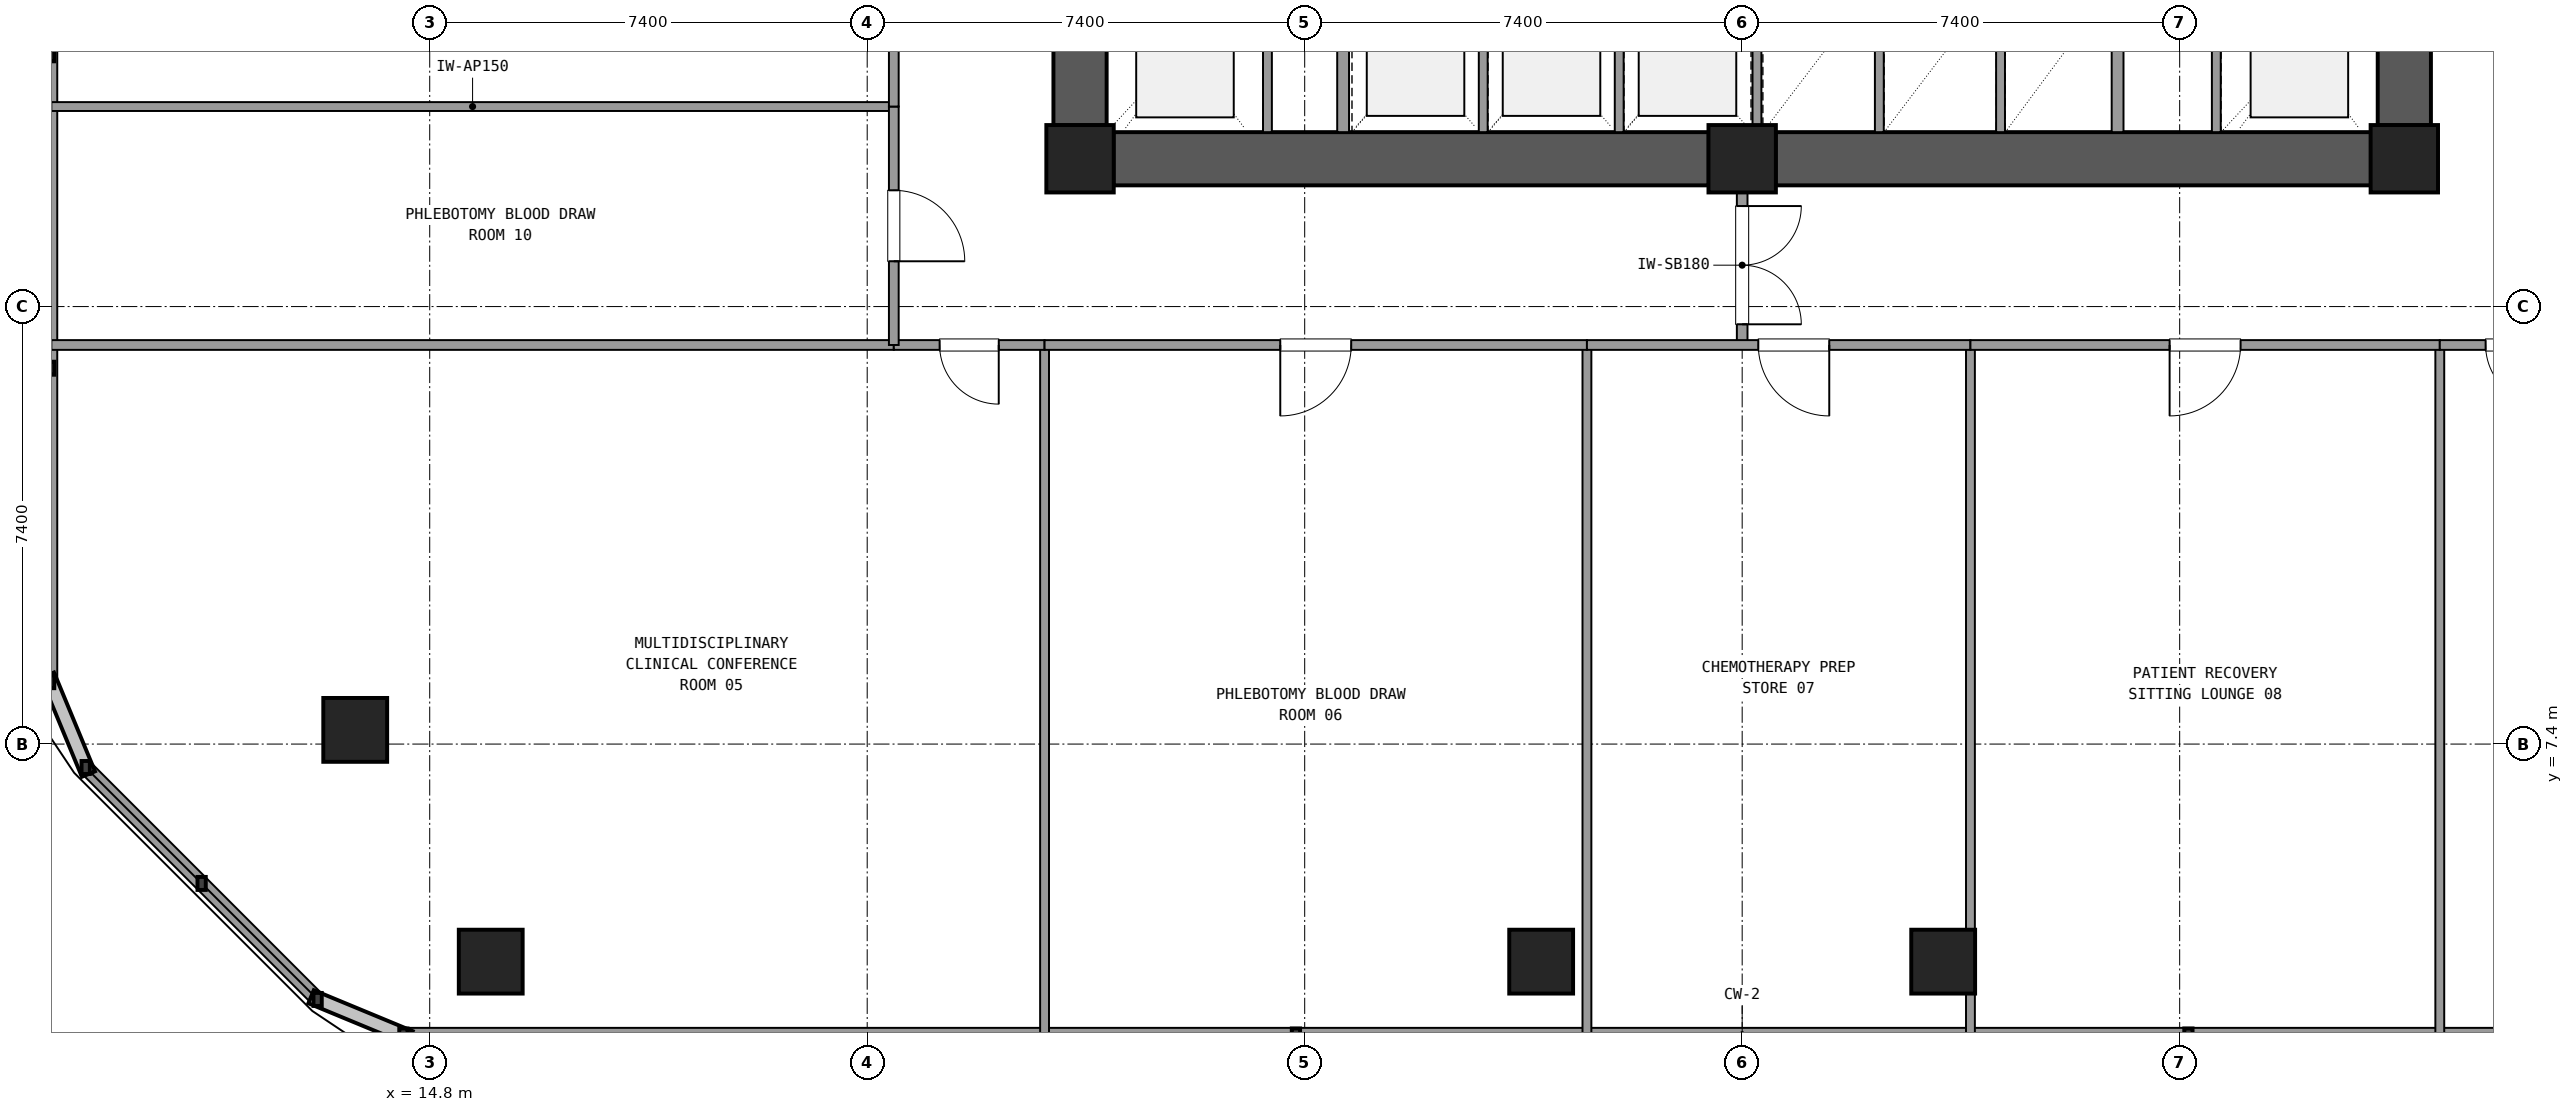
"""IFC4 building model, lengths in metres.
Left out: names, types, materials, properties, quantities, classifications, styles, units other than length and angle.
Written with IfcOpenShell. Run it as: python <this file> out.ifc"""

import sys

from ifc_helpers import new_model, si_unit, direction, frame, frame_2d, origin, origin_2d, place, context, subcontext, project, spatial, rectangle, extrude, element, fill, save


model = new_model("IFC4")
c1 = context("Model", 3, precision=1e-05, world=origin(), true_north=direction((0.0, 1.0)))
c2 = subcontext(c1, "Body", "Model", "MODEL_VIEW")
j1 = project(units=[si_unit("LENGTHUNIT", "METRE"), si_unit("PLANEANGLEUNIT", "RADIAN")], contexts=[c1])
p1 = place(None, origin())
s1 = spatial("IfcSite", under=j1, at=p1, CompositionType="ELEMENT")
p2 = place(p1, origin())
s2 = spatial("IfcBuilding", under=s1, at=p2, CompositionType="ELEMENT")
p3 = place(p2, frame((0.0, 0.0, 56.34)))
s3 = spatial("IfcBuildingStorey", under=s2, at=p3, CompositionType="ELEMENT", Elevation=56.34)
for number, where, z_axis, x_axis in (
    (1, (25.8, 17.3, 0.0), (0.0, 0.0, 1.0), (1.0, 0.0, 0.0)),
    (2, (37.0, 17.3, 0.0), (0.0, 0.0, 1.0), (1.0, 0.0, 0.0)),
    (3, (48.2, 17.3, 0.0), (0.0, 0.0, 1.0), (1.0, 0.0, 0.0)),
):
    element("IfcColumn", number, at=place(p3, frame(where, z_axis=z_axis, x_axis=x_axis)), inside=s3, PredefinedType="COLUMN", context=c2, shape_type="SweptSolid", body=[
        extrude(rectangle(XDim=1.14, YDim=1.14, at=origin_2d()), origin(), (0.0, 0.0, 1.0), 3.6),
    ])
for number, where, z_axis, x_axis in (
    (4, (26.365, 17.3, 0.0), (0.0, 0.0, 1.0), (1.0, 0.0, 0.0)),
    (5, (37.565, 17.3, 0.0), (0.0, 0.0, 1.0), (1.0, 0.0, 0.0)),
):
    element("IfcWall", number, at=place(p3, frame(where, z_axis=z_axis, x_axis=x_axis)), inside=s3, PredefinedType="SHEAR", context=c2, shape_type="SweptSolid", body=[
        extrude(rectangle(XDim=10.07, YDim=0.9, at=frame_2d((5.035, 0.0))), origin(), (0.0, 0.0, 1.0), 3.32),
    ])
p4 = place(p3, frame((48.2, 17.865, 0.0), z_axis=(0.0, 0.0, 1.0), x_axis=(0.0, 1.0, 0.0)))
e6 = element("IfcWall", 6, at=p4, inside=s3, PredefinedType="SHEAR", context=c2, shape_type="SweptSolid", body=[
    extrude(rectangle(XDim=7.47, YDim=0.9, at=frame_2d((3.735, 0.0))), origin(), (0.0, 0.0, 1.0), 3.32),
])
p5 = place(p4, frame((4.185, 0.0, 0.0)))
e7 = element("IfcOpeningElement", 7, at=p5, cuts=e6, PredefinedType="OPENING", context=c2, shape_type="SweptSolid", body=[
    extrude(rectangle(XDim=1.2, YDim=2.15, at=frame_2d((0.6, 1.075))), frame((0.0, 0.46, 0.0), z_axis=(0.0, -1.0, 0.0), x_axis=(1.0, 0.0, 0.0)), (0.0, 0.0, 1.0), 0.92),
])
p6 = place(p3, frame((25.8, 25.335, 0.0), z_axis=(0.0, 0.0, 1.0), x_axis=(0.0, -1.0, 0.0)))
e8 = element("IfcWall", 8, at=p6, inside=s3, PredefinedType="SHEAR", context=c2, shape_type="SweptSolid", body=[
    extrude(rectangle(XDim=7.47, YDim=0.9, at=frame_2d((3.735, 0.0))), origin(), (0.0, 0.0, 1.0), 3.32),
])
p7 = place(p6, frame((2.085, 0.0, 0.0)))
e9 = element("IfcOpeningElement", 9, at=p7, cuts=e8, PredefinedType="OPENING", context=c2, shape_type="SweptSolid", body=[
    extrude(rectangle(XDim=1.2, YDim=2.15, at=frame_2d((0.6, 1.075))), frame((0.0, 0.46, 0.0), z_axis=(0.0, -1.0, 0.0), x_axis=(1.0, 0.0, 0.0)), (0.0, 0.0, 1.0), 0.92),
])
for number, where, z_axis, x_axis in (
    (10, (13.54, 7.64, 0.0), (0.0, 0.0, 1.0), (1.0, 0.0, 0.0)),
    (11, (15.832, 3.72, 0.0), (0.0, 0.0, 1.0), (1.0, 0.0, 0.0)),
    (12, (33.6, 3.72, 0.0), (0.0, 0.0, 1.0), (1.0, 0.0, 0.0)),
    (13, (40.4, 3.72, 0.0), (0.0, 0.0, 1.0), (1.0, 0.0, 0.0)),
):
    element("IfcColumn", number, at=place(p3, frame(where, z_axis=z_axis, x_axis=x_axis)), inside=s3, PredefinedType="COLUMN", context=c2, shape_type="SweptSolid", body=[
        extrude(rectangle(XDim=1.08, YDim=1.08, at=origin_2d()), origin(), (0.0, 0.0, 1.0), 3.6),
    ])
p8 = place(p3, frame((14.355, 2.48, 0.0), z_axis=(0.0, 0.0, 1.0), x_axis=(1.0, 0.0, 0.0)))
e14 = element("IfcWall", 14, at=p8, inside=s3, PredefinedType="SOLIDWALL", context=c2, shape_type="SweptSolid", body=[
    extrude(rectangle(XDim=45.29, YDim=0.24, at=frame_2d((22.645, 0.0))), origin(), (0.0, 0.0, 1.0), 0.85),
])
p9 = place(p3, frame((8.38, 24.36, 0.0), z_axis=(0.0, 0.0, 1.0), x_axis=(0.0, -1.0, 0.0)))
e15 = element("IfcWall", 15, at=p9, inside=s3, PredefinedType="SOLIDWALL", context=c2, shape_type="SweptSolid", body=[
    extrude(rectangle(XDim=15.905, YDim=0.24, at=frame_2d((7.953, 0.0))), origin(), (0.0, 0.0, 1.0), 0.85),
])
p10 = place(p3, frame((8.981, 7.004, 0.0), z_axis=(0.0, 0.0, 1.0), x_axis=(0.707128783731, -0.707084777957, 0.0)))
e16 = element("IfcWall", 16, at=p10, inside=s3, PredefinedType="SOLIDWALL", context=c2, shape_type="SweptSolid", body=[
    extrude(rectangle(XDim=5.548, YDim=0.24, at=frame_2d((2.774, 0.0))), origin(), (0.0, 0.0, 1.0), 0.85),
])
p11 = place(p3, frame((30.25, 17.75, 0.0), z_axis=(0.0, 0.0, 1.0), x_axis=(0.0, 1.0, 0.0)))
e17 = element("IfcWall", 17, at=p11, inside=s3, PredefinedType="SOLIDWALL", context=c2, shape_type="SweptSolid", body=[
    extrude(rectangle(XDim=6.9, YDim=0.2, at=frame_2d((3.45, 0.0))), origin(), (0.0, 0.0, 1.0), 2.61),
])
p12 = place(p11, frame((4.15, 0.0, 0.0)))
e18 = element("IfcOpeningElement", 18, at=p12, cuts=e17, PredefinedType="OPENING", context=c2, shape_type="SweptSolid", body=[
    extrude(rectangle(XDim=1.2, YDim=2.15, at=frame_2d((0.6, 1.075))), frame((0.0, 0.11, 0.0), z_axis=(0.0, -1.0, 0.0), x_axis=(1.0, 0.0, 0.0)), (0.0, 0.0, 1.0), 0.22),
])
p13 = place(p3, frame((28.97, 17.75, 0.0), z_axis=(0.0, 0.0, 1.0), x_axis=(0.0, 1.0, 0.0)))
e19 = element("IfcWall", 19, at=p13, inside=s3, PredefinedType="PARTITIONING", context=c2, shape_type="SweptSolid", body=[
    extrude(rectangle(XDim=2.95, YDim=0.15, at=frame_2d((1.475, 0.0))), origin(), (0.0, 0.0, 1.0), 2.61),
])
p14 = place(p3, frame((43.35, 17.75, 0.0), z_axis=(0.0, 0.0, 1.0), x_axis=(0.0, 1.0, 0.0)))
e20 = element("IfcWall", 20, at=p14, inside=s3, PredefinedType="SOLIDWALL", context=c2, shape_type="SweptSolid", body=[
    extrude(rectangle(XDim=6.9, YDim=0.2, at=frame_2d((3.45, 0.0))), origin(), (0.0, 0.0, 1.0), 2.61),
])
p15 = place(p14, frame((4.15, 0.0, 0.0)))
e21 = element("IfcOpeningElement", 21, at=p15, cuts=e20, PredefinedType="OPENING", context=c2, shape_type="SweptSolid", body=[
    extrude(rectangle(XDim=1.2, YDim=2.15, at=frame_2d((0.6, 1.075))), frame((0.0, 0.11, 0.0), z_axis=(0.0, -1.0, 0.0), x_axis=(1.0, 0.0, 0.0)), (0.0, 0.0, 1.0), 0.22),
])
p16 = place(p3, frame((45.02, 17.75, 0.0), z_axis=(0.0, 0.0, 1.0), x_axis=(0.0, 1.0, 0.0)))
e22 = element("IfcWall", 22, at=p16, inside=s3, PredefinedType="PARTITIONING", context=c2, shape_type="SweptSolid", body=[
    extrude(rectangle(XDim=2.95, YDim=0.15, at=frame_2d((1.475, 0.0))), origin(), (0.0, 0.0, 1.0), 2.61),
])
for number, where, z_axis, x_axis in (
    (23, (32.62, 17.75, 0.0), (0.0, 0.0, 1.0), (0.0, 1.0, 0.0)),
    (24, (34.92, 17.75, 0.0), (0.0, 0.0, 1.0), (0.0, 1.0, 0.0)),
    (25, (39.32, 17.75, 0.0), (0.0, 0.0, 1.0), (0.0, 1.0, 0.0)),
    (26, (41.37, 17.75, 0.0), (0.0, 0.0, 1.0), (0.0, 1.0, 0.0)),
):
    element("IfcWall", number, at=place(p3, frame(where, z_axis=z_axis, x_axis=x_axis)), inside=s3, PredefinedType="PARTITIONING", context=c2, shape_type="SweptSolid", body=[
        extrude(rectangle(XDim=2.61, YDim=0.15, at=frame_2d((1.305, 0.0))), origin(), (0.0, 0.0, 1.0), 2.61),
    ])
p17 = place(p3, frame((37.25, 17.75, 0.0), z_axis=(0.0, 0.0, 1.0), x_axis=(0.0, 1.0, 0.0)))
e27 = element("IfcWall", 27, at=p17, inside=s3, PredefinedType="PARTITIONING", context=c2, shape_type="SweptSolid", body=[
    extrude(rectangle(XDim=2.73, YDim=0.15, at=frame_2d((1.365, 0.0))), origin(), (0.0, 0.0, 1.0), 2.61),
])
p18 = place(p3, frame((37.0, 14.15, 0.0), z_axis=(0.0, 0.0, 1.0), x_axis=(0.0, 1.0, 0.0)))
e28 = element("IfcWall", 28, at=p18, inside=s3, PredefinedType="PARTITIONING", context=c2, shape_type="SweptSolid", body=[
    extrude(rectangle(XDim=2.7, YDim=0.18, at=frame_2d((1.35, 0.0))), origin(), (0.0, 0.0, 1.0), 2.61),
])
p19 = place(p18, frame((0.35, 0.0, 0.0)))
e29 = element("IfcOpeningElement", 29, at=p19, cuts=e28, PredefinedType="OPENING", context=c2, shape_type="SweptSolid", body=[
    extrude(rectangle(XDim=2.0, YDim=2.2, at=frame_2d((1.0, 1.1))), frame((0.0, 0.1, 0.0), z_axis=(0.0, -1.0, 0.0), x_axis=(1.0, 0.0, 0.0)), (0.0, 0.0, 1.0), 0.2),
])
p20 = place(p3, frame((8.4, 14.15, 0.0), z_axis=(0.0, 0.0, 1.0), x_axis=(1.0, 0.0, 0.0)))
e30 = element("IfcWall", 30, at=p20, inside=s3, PredefinedType="PARTITIONING", context=c2, shape_type="SweptSolid", body=[
    extrude(rectangle(XDim=14.25, YDim=0.165, at=frame_2d((7.125, 0.0))), origin(), (0.0, 0.0, 1.0), 2.61),
])
p21 = place(p3, frame((25.2, 14.15, 0.0), z_axis=(0.0, 0.0, 1.0), x_axis=(0.0, -1.0, 0.0)))
e31 = element("IfcWall", 31, at=p21, inside=s3, PredefinedType="PARTITIONING", context=c2, shape_type="SweptSolid", body=[
    extrude(rectangle(XDim=11.65, YDim=0.15, at=frame_2d((5.825, 0.0))), origin(), (0.0, 0.0, 1.0), 2.61),
])
p22 = place(p3, frame((22.65, 14.15, 0.0), z_axis=(0.0, 0.0, 1.0), x_axis=(1.0, 0.0, 0.0)))
e32 = element("IfcWall", 32, at=p22, inside=s3, PredefinedType="PARTITIONING", context=c2, shape_type="SweptSolid", body=[
    extrude(rectangle(XDim=2.55, YDim=0.165, at=frame_2d((1.275, 0.0))), origin(), (0.0, 0.0, 1.0), 2.61),
])
p23 = place(p22, frame((0.775, 0.0, 0.0)))
e33 = element("IfcOpeningElement", 33, at=p23, cuts=e32, PredefinedType="OPENING", context=c2, shape_type="SweptSolid", body=[
    extrude(rectangle(XDim=1.0, YDim=2.15, at=frame_2d((0.5, 1.075))), frame((0.0, 0.093, 0.0), z_axis=(0.0, -1.0, 0.0), x_axis=(1.0, 0.0, 0.0)), (0.0, 0.0, 1.0), 0.185),
])
p24 = place(p3, frame((34.374, 14.15, 0.0), z_axis=(0.0, 0.0, 1.0), x_axis=(0.0, -1.0, 0.0)))
e34 = element("IfcWall", 34, at=p24, inside=s3, PredefinedType="PARTITIONING", context=c2, shape_type="SweptSolid", body=[
    extrude(rectangle(XDim=11.65, YDim=0.15, at=frame_2d((5.825, 0.0))), origin(), (0.0, 0.0, 1.0), 2.61),
])
p25 = place(p3, frame((25.2, 14.15, 0.0), z_axis=(0.0, 0.0, 1.0), x_axis=(1.0, 0.0, 0.0)))
e35 = element("IfcWall", 35, at=p25, inside=s3, PredefinedType="PARTITIONING", context=c2, shape_type="SweptSolid", body=[
    extrude(rectangle(XDim=9.174, YDim=0.165, at=frame_2d((4.587, 0.0))), origin(), (0.0, 0.0, 1.0), 2.61),
])
p26 = place(p25, frame((3.987, 0.0, 0.0)))
e36 = element("IfcOpeningElement", 36, at=p26, cuts=e35, PredefinedType="OPENING", context=c2, shape_type="SweptSolid", body=[
    extrude(rectangle(XDim=1.2, YDim=2.15, at=frame_2d((0.6, 1.075))), frame((0.0, 0.093, 0.0), z_axis=(0.0, -1.0, 0.0), x_axis=(1.0, 0.0, 0.0)), (0.0, 0.0, 1.0), 0.185),
])
p27 = place(p3, frame((40.861, 14.15, 0.0), z_axis=(0.0, 0.0, 1.0), x_axis=(0.0, -1.0, 0.0)))
e37 = element("IfcWall", 37, at=p27, inside=s3, PredefinedType="PARTITIONING", context=c2, shape_type="SweptSolid", body=[
    extrude(rectangle(XDim=11.65, YDim=0.15, at=frame_2d((5.825, 0.0))), origin(), (0.0, 0.0, 1.0), 2.61),
])
p28 = place(p3, frame((34.374, 14.15, 0.0), z_axis=(0.0, 0.0, 1.0), x_axis=(1.0, 0.0, 0.0)))
e38 = element("IfcWall", 38, at=p28, inside=s3, PredefinedType="PARTITIONING", context=c2, shape_type="SweptSolid", body=[
    extrude(rectangle(XDim=6.487, YDim=0.165, at=frame_2d((3.244, 0.0))), origin(), (0.0, 0.0, 1.0), 2.61),
])
p29 = place(p28, frame((2.899, 0.0, 0.0)))
e39 = element("IfcOpeningElement", 39, at=p29, cuts=e38, PredefinedType="OPENING", context=c2, shape_type="SweptSolid", body=[
    extrude(rectangle(XDim=1.2, YDim=2.15, at=frame_2d((0.6, 1.075))), frame((0.0, 0.093, 0.0), z_axis=(0.0, -1.0, 0.0), x_axis=(1.0, 0.0, 0.0)), (0.0, 0.0, 1.0), 0.185),
])
p30 = place(p3, frame((48.8, 14.15, 0.0), z_axis=(0.0, 0.0, 1.0), x_axis=(0.0, -1.0, 0.0)))
e40 = element("IfcWall", 40, at=p30, inside=s3, PredefinedType="PARTITIONING", context=c2, shape_type="SweptSolid", body=[
    extrude(rectangle(XDim=11.65, YDim=0.15, at=frame_2d((5.825, 0.0))), origin(), (0.0, 0.0, 1.0), 2.61),
])
p31 = place(p3, frame((40.861, 14.15, 0.0), z_axis=(0.0, 0.0, 1.0), x_axis=(1.0, 0.0, 0.0)))
e41 = element("IfcWall", 41, at=p31, inside=s3, PredefinedType="PARTITIONING", context=c2, shape_type="SweptSolid", body=[
    extrude(rectangle(XDim=7.939, YDim=0.165, at=frame_2d((3.969, 0.0))), origin(), (0.0, 0.0, 1.0), 2.61),
])
p32 = place(p31, frame((3.369, 0.0, 0.0)))
e42 = element("IfcOpeningElement", 42, at=p32, cuts=e41, PredefinedType="OPENING", context=c2, shape_type="SweptSolid", body=[
    extrude(rectangle(XDim=1.2, YDim=2.15, at=frame_2d((0.6, 1.075))), frame((0.0, 0.093, 0.0), z_axis=(0.0, -1.0, 0.0), x_axis=(1.0, 0.0, 0.0)), (0.0, 0.0, 1.0), 0.185),
])
p33 = place(p3, frame((48.8, 14.15, 0.0), z_axis=(0.0, 0.0, 1.0), x_axis=(1.0, 0.0, 0.0)))
e43 = element("IfcWall", 43, at=p33, inside=s3, PredefinedType="PARTITIONING", context=c2, shape_type="SweptSolid", body=[
    extrude(rectangle(XDim=2.55, YDim=0.165, at=frame_2d((1.275, 0.0))), origin(), (0.0, 0.0, 1.0), 2.61),
])
p34 = place(p33, frame((0.775, 0.0, 0.0)))
e44 = element("IfcOpeningElement", 44, at=p34, cuts=e43, PredefinedType="OPENING", context=c2, shape_type="SweptSolid", body=[
    extrude(rectangle(XDim=1.0, YDim=2.15, at=frame_2d((0.5, 1.075))), frame((0.0, 0.093, 0.0), z_axis=(0.0, -1.0, 0.0), x_axis=(1.0, 0.0, 0.0)), (0.0, 0.0, 1.0), 0.185),
])
p35 = place(p3, frame((22.65, 18.183, 0.0), z_axis=(0.0, 0.0, 1.0), x_axis=(-1.0, 0.0, 0.0)))
e45 = element("IfcWall", 45, at=p35, inside=s3, PredefinedType="PARTITIONING", context=c2, shape_type="SweptSolid", body=[
    extrude(rectangle(XDim=14.25, YDim=0.15, at=frame_2d((7.125, 0.0))), origin(), (0.0, 0.0, 1.0), 2.61),
])
p36 = place(p3, frame((22.65, 14.15, 0.0), z_axis=(0.0, 0.0, 1.0), x_axis=(0.0, 1.0, 0.0)))
e46 = element("IfcWall", 46, at=p36, inside=s3, PredefinedType="PARTITIONING", context=c2, shape_type="SweptSolid", body=[
    extrude(rectangle(XDim=4.033, YDim=0.165, at=frame_2d((2.017, 0.0))), origin(), (0.0, 0.0, 1.0), 2.61),
])
p37 = place(p36, frame((1.416, 0.0, 0.0)))
e47 = element("IfcOpeningElement", 47, at=p37, cuts=e46, PredefinedType="OPENING", context=c2, shape_type="SweptSolid", body=[
    extrude(rectangle(XDim=1.2, YDim=2.15, at=frame_2d((0.6, 1.075))), frame((0.0, 0.093, 0.0), z_axis=(0.0, -1.0, 0.0), x_axis=(1.0, 0.0, 0.0)), (0.0, 0.0, 1.0), 0.185),
])
p38 = place(p3, frame((22.65, 18.183, 0.0), z_axis=(0.0, 0.0, 1.0), x_axis=(0.0, 1.0, 0.0)))
e48 = element("IfcWall", 48, at=p38, inside=s3, PredefinedType="PARTITIONING", context=c2, shape_type="SweptSolid", body=[
    extrude(rectangle(XDim=5.132, YDim=0.165, at=frame_2d((2.566, 0.0))), origin(), (0.0, 0.0, 1.0), 2.61),
])
p39 = place(p38, frame((1.966, 0.0, 0.0)))
e49 = element("IfcOpeningElement", 49, at=p39, cuts=e48, PredefinedType="OPENING", context=c2, shape_type="SweptSolid", body=[
    extrude(rectangle(XDim=1.2, YDim=2.15, at=frame_2d((0.6, 1.075))), frame((0.0, 0.093, 0.0), z_axis=(0.0, -1.0, 0.0), x_axis=(1.0, 0.0, 0.0)), (0.0, 0.0, 1.0), 0.185),
])
p40 = place(p19, frame((2.0, 0.0, 0.0), z_axis=(0.0, 0.0, 1.0), x_axis=(-1.0, 0.0, 0.0)))
e50 = element("IfcDoor", 50, at=p40, inside=s3, OperationType="DOUBLE_DOOR_SINGLE_SWING", PredefinedType="DOOR", context=c2, shape_type="SweptSolid", body=[
    extrude(rectangle(XDim=2.0, YDim=2.2, at=frame_2d((1.0, 1.1))), frame((0.0, 0.025, 0.0), z_axis=(0.0, -1.0, 0.0), x_axis=(1.0, 0.0, 0.0)), (0.0, 0.0, 1.0), 0.05),
])
fill(e29, e50)
p41 = place(p23, frame((1.0, 0.0, 0.0), z_axis=(0.0, 0.0, 1.0), x_axis=(-1.0, 0.0, 0.0)))
e51 = element("IfcDoor", 51, at=p41, inside=s3, OperationType="SINGLE_SWING_RIGHT", PredefinedType="DOOR", context=c2, shape_type="SweptSolid", body=[
    extrude(rectangle(XDim=1.0, YDim=2.15, at=frame_2d((0.5, 1.075))), frame((0.0, 0.025, 0.0), z_axis=(0.0, -1.0, 0.0), x_axis=(1.0, 0.0, 0.0)), (0.0, 0.0, 1.0), 0.05),
])
fill(e33, e51)
p42 = place(p26, frame((1.2, 0.0, 0.0), z_axis=(0.0, 0.0, 1.0), x_axis=(-1.0, 0.0, 0.0)))
e52 = element("IfcDoor", 52, at=p42, inside=s3, OperationType="SINGLE_SWING_LEFT", PredefinedType="DOOR", context=c2, shape_type="SweptSolid", body=[
    extrude(rectangle(XDim=1.2, YDim=2.15, at=frame_2d((0.6, 1.075))), frame((0.0, 0.025, 0.0), z_axis=(0.0, -1.0, 0.0), x_axis=(1.0, 0.0, 0.0)), (0.0, 0.0, 1.0), 0.05),
])
fill(e36, e52)
p43 = place(p29, frame((1.2, 0.0, 0.0), z_axis=(0.0, 0.0, 1.0), x_axis=(-1.0, 0.0, 0.0)))
e53 = element("IfcDoor", 53, at=p43, inside=s3, OperationType="SINGLE_SWING_RIGHT", PredefinedType="DOOR", context=c2, shape_type="SweptSolid", body=[
    extrude(rectangle(XDim=1.2, YDim=2.15, at=frame_2d((0.6, 1.075))), frame((0.0, 0.025, 0.0), z_axis=(0.0, -1.0, 0.0), x_axis=(1.0, 0.0, 0.0)), (0.0, 0.0, 1.0), 0.05),
])
fill(e39, e53)
p44 = place(p32, frame((1.2, 0.0, 0.0), z_axis=(0.0, 0.0, 1.0), x_axis=(-1.0, 0.0, 0.0)))
e54 = element("IfcDoor", 54, at=p44, inside=s3, OperationType="SINGLE_SWING_LEFT", PredefinedType="DOOR", context=c2, shape_type="SweptSolid", body=[
    extrude(rectangle(XDim=1.2, YDim=2.15, at=frame_2d((0.6, 1.075))), frame((0.0, 0.025, 0.0), z_axis=(0.0, -1.0, 0.0), x_axis=(1.0, 0.0, 0.0)), (0.0, 0.0, 1.0), 0.05),
])
fill(e42, e54)
p45 = place(p34, frame((1.0, 0.0, 0.0), z_axis=(0.0, 0.0, 1.0), x_axis=(-1.0, 0.0, 0.0)))
e55 = element("IfcDoor", 55, at=p45, inside=s3, OperationType="SINGLE_SWING_RIGHT", PredefinedType="DOOR", context=c2, shape_type="SweptSolid", body=[
    extrude(rectangle(XDim=1.0, YDim=2.15, at=frame_2d((0.5, 1.075))), frame((0.0, 0.025, 0.0), z_axis=(0.0, -1.0, 0.0), x_axis=(1.0, 0.0, 0.0)), (0.0, 0.0, 1.0), 0.05),
])
fill(e44, e55)
p46 = place(p37, frame((1.2, 0.0, 0.0), z_axis=(0.0, 0.0, 1.0), x_axis=(-1.0, 0.0, 0.0)))
e56 = element("IfcDoor", 56, at=p46, inside=s3, OperationType="SINGLE_SWING_LEFT", PredefinedType="DOOR", context=c2, shape_type="SweptSolid", body=[
    extrude(rectangle(XDim=1.2, YDim=2.15, at=frame_2d((0.6, 1.075))), frame((0.0, 0.025, 0.0), z_axis=(0.0, -1.0, 0.0), x_axis=(1.0, 0.0, 0.0)), (0.0, 0.0, 1.0), 0.05),
])
fill(e47, e56)
save(model, sys.argv[1])
